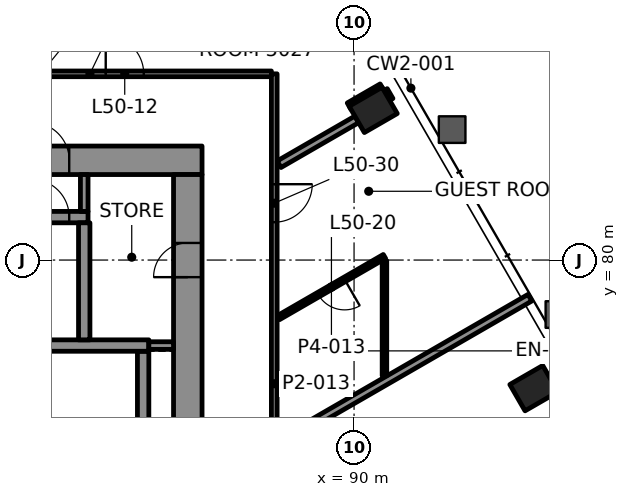
"""IFC4 building model, lengths in metres.
Left out: names, types, materials, properties, quantities, classifications, styles, units other than length and angle.
Written with IfcOpenShell. Run it as: python <this file> out.ifc"""

import sys

from ifc_helpers import new_model, si_unit, direction, frame, frame_2d, origin, origin_2d, place, context, subcontext, project, spatial, rectangle, hollow_rectangle, extrude, element, fill, save


model = new_model("IFC4")
c1 = context("Model", 3, precision=1e-05, world=origin(), true_north=direction((0.0, 1.0)))
c2 = subcontext(c1, "Body", "Model", "MODEL_VIEW")
j1 = project(units=[si_unit("LENGTHUNIT", "METRE"), si_unit("PLANEANGLEUNIT", "RADIAN")], contexts=[c1])
p1 = place(None, origin())
s1 = spatial("IfcSite", under=j1, at=p1, CompositionType="ELEMENT")
p2 = place(p1, origin())
s2 = spatial("IfcBuilding", under=s1, at=p2, CompositionType="ELEMENT")
p3 = place(p2, frame((0.0, 0.0, 214.3)))
s3 = spatial("IfcBuildingStorey", under=s2, at=p3, CompositionType="ELEMENT", Elevation=214.3)
for number, where, z_axis, x_axis in (
    (1, (94.732, 76.628, -0.0), (0.0, 0.0, 1.0), (-0.5, 0.866, 0.0)),
    (2, (90.504, 83.951, -0.0), (0.0, 0.0, 1.0), (-0.5, 0.866, 0.0)),
):
    element("IfcColumn", number, at=place(p3, frame(where, z_axis=z_axis, x_axis=x_axis)), inside=s3, PredefinedType="COLUMN", context=c2, shape_type="SweptSolid", body=[
        extrude(hollow_rectangle(XDim=0.8, YDim=1.0, WallThickness=0.05, at=origin_2d()), origin(), (0.0, 0.0, 1.0), 3.9),
    ])
p4 = place(p3, frame((64.0, 82.625, 0.0), z_axis=(0.0, 0.0, 1.0), x_axis=(1.0, 0.0, 0.0)))
e3 = element("IfcWall", 3, at=p4, inside=s3, PredefinedType="SHEAR", context=c2, shape_type="SweptSolid", body=[
    extrude(rectangle(XDim=22.0, YDim=0.75, at=frame_2d((11.0, 0.0))), origin(), (0.0, 0.0, 1.0), 3.7),
])
p5 = place(p4, frame((3.695, 0.0, 0.0)))
e4 = element("IfcOpeningElement", 4, at=p5, cuts=e3, PredefinedType="OPENING", context=c2, shape_type="SweptSolid", body=[
    extrude(rectangle(XDim=1.0, YDim=2.1, at=frame_2d((0.5, 1.05))), frame((0.0, 0.385, 0.0), z_axis=(0.0, -1.0, 0.0), x_axis=(1.0, 0.0, 0.0)), (0.0, 0.0, 1.0), 0.77),
])
p6 = place(p4, frame((17.505, 0.0, 0.0)))
e5 = element("IfcOpeningElement", 5, at=p6, cuts=e3, PredefinedType="OPENING", context=c2, shape_type="SweptSolid", body=[
    extrude(rectangle(XDim=1.0, YDim=2.1, at=frame_2d((0.5, 1.05))), frame((0.0, 0.385, 0.0), z_axis=(0.0, -1.0, 0.0), x_axis=(1.0, 0.0, 0.0)), (0.0, 0.0, 1.0), 0.77),
])
p7 = place(p4, frame((10.65, 0.0, 0.0)))
e6 = element("IfcOpeningElement", 6, at=p7, cuts=e3, PredefinedType="OPENING", context=c2, shape_type="SweptSolid", body=[
    extrude(rectangle(XDim=0.9, YDim=2.1, at=frame_2d((0.45, 1.05))), frame((0.0, 0.385, 0.0), z_axis=(0.0, -1.0, 0.0), x_axis=(1.0, 0.0, 0.0)), (0.0, 0.0, 1.0), 0.77),
])
p8 = place(p3, frame((85.625, 67.75, 0.0), z_axis=(0.0, 0.0, 1.0), x_axis=(0.0, 1.0, 0.0)))
e7 = element("IfcWall", 7, at=p8, inside=s3, PredefinedType="SHEAR", context=c2, shape_type="SweptSolid", body=[
    extrude(rectangle(XDim=14.5, YDim=0.75, at=frame_2d((7.25, 0.0))), origin(), (0.0, 0.0, 1.0), 3.7),
])
p9 = place(p8, frame((4.65, 0.0, 0.0)))
e8 = element("IfcOpeningElement", 8, at=p9, cuts=e7, PredefinedType="OPENING", context=c2, shape_type="SweptSolid", body=[
    extrude(rectangle(XDim=1.8, YDim=2.1, at=frame_2d((0.9, 1.05))), frame((0.0, 0.385, 0.0), z_axis=(0.0, -1.0, 0.0), x_axis=(1.0, 0.0, 0.0)), (0.0, 0.0, 1.0), 0.77),
])
p10 = place(p8, frame((11.8, 0.0, 0.0)))
e9 = element("IfcOpeningElement", 9, at=p10, cuts=e7, PredefinedType="OPENING", context=c2, shape_type="SweptSolid", body=[
    extrude(rectangle(XDim=0.9, YDim=2.1, at=frame_2d((0.45, 1.05))), frame((0.0, 0.385, 0.0), z_axis=(0.0, -1.0, 0.0), x_axis=(1.0, 0.0, 0.0)), (0.0, 0.0, 1.0), 0.77),
])
p11 = place(p3, frame((84.45, 75.0, 0.0), z_axis=(0.0, 0.0, 1.0), x_axis=(0.0, 1.0, 0.0)))
e10 = element("IfcWall", 10, at=p11, inside=s3, PredefinedType="SHEAR", context=c2, shape_type="SweptSolid", body=[
    extrude(rectangle(XDim=2.6, YDim=0.3, at=frame_2d((1.3, 0.0))), origin(), (0.0, 0.0, 1.0), 3.7),
])
p12 = place(p3, frame((67.15, 77.75, 0.0), z_axis=(0.0, 0.0, 1.0), x_axis=(1.0, 0.0, 0.0)))
e11 = element("IfcWall", 11, at=p12, inside=s3, PredefinedType="SHEAR", context=c2, shape_type="SweptSolid", body=[
    extrude(rectangle(XDim=17.45, YDim=0.3, at=frame_2d((8.725, 0.0))), origin(), (0.0, 0.0, 1.0), 3.7),
])
p13 = place(p12, frame((0.545, 0.0, 0.0)))
e12 = element("IfcOpeningElement", 12, at=p13, cuts=e11, PredefinedType="OPENING", context=c2, shape_type="SweptSolid", body=[
    extrude(rectangle(XDim=1.0, YDim=2.1, at=frame_2d((0.5, 1.05))), frame((0.0, 0.16, 0.0), z_axis=(0.0, -1.0, 0.0), x_axis=(1.0, 0.0, 0.0)), (0.0, 0.0, 1.0), 0.32),
])
p14 = place(p3, frame((76.14, 81.13, 0.0), z_axis=(0.0, 0.0, 1.0), x_axis=(1.0, 0.0, 0.0)))
e13 = element("IfcWall", 13, at=p14, inside=s3, PredefinedType="SHEAR", context=c2, shape_type="SweptSolid", body=[
    extrude(rectangle(XDim=6.86, YDim=0.3, at=frame_2d((3.43, 0.0))), origin(), (0.0, 0.0, 1.0), 3.7),
])
p15 = place(p14, frame((5.365, 0.0, 0.0)))
e14 = element("IfcOpeningElement", 14, at=p15, cuts=e13, PredefinedType="OPENING", context=c2, shape_type="SweptSolid", body=[
    extrude(rectangle(XDim=1.0, YDim=2.1, at=frame_2d((0.5, 1.05))), frame((0.0, 0.16, 0.0), z_axis=(0.0, -1.0, 0.0), x_axis=(1.0, 0.0, 0.0)), (0.0, 0.0, 1.0), 0.32),
])
p16 = place(p3, frame((82.9, 77.9, 0.0), z_axis=(0.0, 0.0, 1.0), x_axis=(0.0, 1.0, 0.0)))
e15 = element("IfcWall", 15, at=p16, inside=s3, PredefinedType="SHEAR", context=c2, shape_type="SweptSolid", body=[
    extrude(rectangle(XDim=3.08, YDim=0.3, at=frame_2d((1.54, 0.0))), origin(), (0.0, 0.0, 1.0), 3.7),
])
p17 = place(p3, frame((78.275, 84.9, 0.0), z_axis=(0.0, 0.0, 1.0), x_axis=(1.0, 0.0, 0.0)))
e16 = element("IfcWall", 16, at=p17, inside=s3, PredefinedType="PARTITIONING", context=c2, shape_type="SweptSolid", body=[
    extrude(rectangle(XDim=9.55, YDim=0.15, at=frame_2d((4.775, 0.0))), origin(), (0.0, 0.0, 1.0), 3.097),
])
p18 = place(p17, frame((5.191, 0.0, 0.0)))
e17 = element("IfcOpeningElement", 17, at=p18, cuts=e16, PredefinedType="OPENING", context=c2, shape_type="SweptSolid", body=[
    extrude(rectangle(XDim=1.0, YDim=2.1, at=frame_2d((0.5, 1.05))), frame((0.0, 0.085, 0.0), z_axis=(0.0, -1.0, 0.0), x_axis=(1.0, 0.0, 0.0)), (0.0, 0.0, 1.0), 0.17),
])
p19 = place(p3, frame((88.027, 75.198, 0.0), z_axis=(0.0, 0.0, 1.0), x_axis=(0.866028758719, 0.499994189038, 0.0)))
e18 = element("IfcWall", 18, at=p19, inside=s3, PredefinedType="PARTITIONING", context=c2, shape_type="SweptSolid", body=[
    extrude(rectangle(XDim=7.622, YDim=0.2, at=frame_2d((3.811, 0.0))), origin(), (0.0, 0.0, 1.0), 3.022),
])
p20 = place(p3, frame((90.8, 80.095, 0.0), z_axis=(0.0, 0.0, 1.0), x_axis=(-0.866029130051, -0.499993545862, 0.0)))
e19 = element("IfcWall", 19, at=p20, inside=s3, PredefinedType="PARTITIONING", context=c2, shape_type="SweptSolid", body=[
    extrude(rectangle(XDim=3.222, YDim=0.12, at=frame_2d((1.611, 0.0))), origin(), (0.0, 0.0, 1.0), 3.1),
])
p21 = place(p20, frame((1.211, 0.0, 0.0)))
e20 = element("IfcOpeningElement", 20, at=p21, cuts=e19, PredefinedType="OPENING", context=c2, shape_type="SweptSolid", body=[
    extrude(rectangle(XDim=0.8, YDim=2.1, at=frame_2d((0.4, 1.05))), frame((0.0, 0.07, 0.0), z_axis=(0.0, -1.0, 0.0), x_axis=(1.0, 0.0, 0.0)), (0.0, 0.0, 1.0), 0.14),
])
p22 = place(p3, frame((88.027, 82.521, 0.0), z_axis=(0.0, 0.0, 1.0), x_axis=(0.866032292145, 0.49998806882, 0.0)))
e21 = element("IfcWall", 21, at=p22, inside=s3, PredefinedType="PARTITIONING", context=c2, shape_type="SweptSolid", body=[
    extrude(rectangle(XDim=2.36, YDim=0.2, at=frame_2d((1.18, 0.0))), origin(), (0.0, 0.0, 1.0), 3.1),
])
p23 = place(p3, frame((89.871, 84.048, 0.0), z_axis=(0.0, 0.0, 1.0), x_axis=(0.866010750942, 0.50002537861, 0.0)))
e22 = element("IfcWall", 22, at=p23, inside=s3, PredefinedType="PARTITIONING", context=c2, shape_type="SweptSolid", body=[
    extrude(rectangle(XDim=1.0, YDim=0.2, at=frame_2d((0.5, 0.0))), origin(), (0.0, 0.0, 1.0), 3.022),
])
p24 = place(p3, frame((80.534, 85.03, 0.0), z_axis=(0.0, 0.0, 1.0), x_axis=(0.866014884179, 0.500018220049, 0.0)))
e23 = element("IfcWall", 23, at=p24, inside=s3, PredefinedType="PARTITIONING", context=c2, shape_type="SweptSolid", body=[
    extrude(rectangle(XDim=5.74, YDim=0.12, at=frame_2d((2.87, 0.0))), origin(), (0.0, 0.0, 1.0), 3.1),
])
p25 = place(p3, frame((90.8, 76.955, 0.0), z_axis=(0.0, 0.0, 1.0), x_axis=(0.0, 1.0, 0.0)))
e24 = element("IfcWall", 24, at=p25, inside=s3, PredefinedType="PARTITIONING", context=c2, shape_type="SweptSolid", body=[
    extrude(rectangle(XDim=3.031, YDim=0.12, at=frame_2d((1.515, 0.0))), origin(), (0.0, 0.0, 1.0), 3.1),
])
p26 = place(p3, frame((87.9, 84.9, 0.0), z_axis=(0.0, 0.0, 1.0), x_axis=(0.0, -1.0, 0.0)))
e25 = element("IfcWall", 25, at=p26, inside=s3, PredefinedType="PARTITIONING", context=c2, shape_type="SweptSolid", body=[
    extrude(rectangle(XDim=16.309, YDim=0.15, at=frame_2d((8.154, 0.0))), origin(), (0.0, 0.0, 1.0), 3.1),
])
p27 = place(p26, frame((2.904, 0.0, 0.0)))
e26 = element("IfcOpeningElement", 26, at=p27, cuts=e25, PredefinedType="OPENING", context=c2, shape_type="SweptSolid", body=[
    extrude(rectangle(XDim=1.0, YDim=2.1, at=frame_2d((0.5, 1.05))), frame((0.0, 0.085, 0.0), z_axis=(0.0, -1.0, 0.0), x_axis=(1.0, 0.0, 0.0)), (0.0, 0.0, 1.0), 0.17),
])
p28 = place(p26, frame((10.227, 0.0, 0.0)))
e27 = element("IfcOpeningElement", 27, at=p28, cuts=e25, PredefinedType="OPENING", context=c2, shape_type="SweptSolid", body=[
    extrude(rectangle(XDim=1.0, YDim=2.1, at=frame_2d((0.5, 1.05))), frame((0.0, 0.085, 0.0), z_axis=(0.0, -1.0, 0.0), x_axis=(1.0, 0.0, 0.0)), (0.0, 0.0, 1.0), 0.17),
])
p29 = place(p3, frame((90.937, 84.201, 0.0), z_axis=(0.0, 0.0, 1.0), x_axis=(-0.500074377092, 0.865982457891, 0.0)))
e28 = element("IfcWall", 28, at=p29, inside=s3, PredefinedType="PARTITIONING", context=c2, shape_type="SweptSolid", body=[
    extrude(rectangle(XDim=0.3, YDim=0.2, at=frame_2d((0.15, 0.0))), origin(), (0.0, 0.0, 1.0), 3.1),
])
p30 = place(p3, frame((84.6, 77.75, 0.0), z_axis=(0.0, 0.0, 1.0), x_axis=(1.0, 0.0, 0.0)))
e29 = element("IfcWall", 29, at=p30, inside=s3, PredefinedType="PARTITIONING", context=c2, shape_type="SweptSolid", body=[
    extrude(rectangle(XDim=0.65, YDim=0.2, at=frame_2d((0.325, 0.0))), origin(), (0.0, 0.0, 1.0), 3.7),
])
p31 = place(p3, frame((82.9, 81.28, 0.0), z_axis=(0.0, 0.0, 1.0), x_axis=(0.0, 1.0, 0.0)))
e30 = element("IfcWall", 30, at=p31, inside=s3, PredefinedType="PARTITIONING", context=c2, shape_type="SweptSolid", body=[
    extrude(rectangle(XDim=0.97, YDim=0.2, at=frame_2d((0.485, 0.0))), origin(), (0.0, 0.0, 1.0), 3.7),
])
p32 = place(p18, origin())
e31 = element("IfcDoor", 31, at=p32, inside=s3, OperationType="SINGLE_SWING_RIGHT", PredefinedType="DOOR", context=c2, shape_type="SweptSolid", body=[
    extrude(rectangle(XDim=1.0, YDim=2.1, at=frame_2d((0.5, 1.05))), frame((0.0, 0.025, 0.0), z_axis=(0.0, -1.0, 0.0), x_axis=(1.0, 0.0, 0.0)), (0.0, 0.0, 1.0), 0.05),
])
fill(e17, e31)
p33 = place(p21, origin())
e32 = element("IfcDoor", 32, at=p33, inside=s3, OperationType="SINGLE_SWING_RIGHT", PredefinedType="DOOR", context=c2, shape_type="SweptSolid", body=[
    extrude(rectangle(XDim=0.8, YDim=2.1, at=frame_2d((0.4, 1.05))), frame((0.0, 0.025, 0.0), z_axis=(0.0, -1.0, 0.0), x_axis=(1.0, 0.0, 0.0)), (0.0, 0.0, 1.0), 0.05),
])
fill(e20, e32)
p34 = place(p27, origin())
e33 = element("IfcDoor", 33, at=p34, inside=s3, OperationType="SINGLE_SWING_LEFT", PredefinedType="DOOR", context=c2, shape_type="SweptSolid", body=[
    extrude(rectangle(XDim=1.0, YDim=2.1, at=frame_2d((0.5, 1.05))), frame((0.0, 0.025, 0.0), z_axis=(0.0, -1.0, 0.0), x_axis=(1.0, 0.0, 0.0)), (0.0, 0.0, 1.0), 0.05),
])
fill(e26, e33)
p35 = place(p15, origin())
e34 = element("IfcDoor", 34, at=p35, inside=s3, OperationType="SINGLE_SWING_RIGHT", PredefinedType="DOOR", context=c2, shape_type="SweptSolid", body=[
    extrude(rectangle(XDim=1.0, YDim=2.1, at=frame_2d((0.5, 1.05))), frame((0.0, 0.025, 0.0), z_axis=(0.0, -1.0, 0.0), x_axis=(1.0, 0.0, 0.0)), (0.0, 0.0, 1.0), 0.05),
])
fill(e14, e34)
p36 = place(p6, origin())
e35 = element("IfcDoor", 35, at=p36, inside=s3, OperationType="SINGLE_SWING_LEFT", PredefinedType="DOOR", context=c2, shape_type="SweptSolid", body=[
    extrude(rectangle(XDim=1.0, YDim=2.1, at=frame_2d((0.5, 1.05))), frame((0.0, 0.095, 0.0), z_axis=(0.0, -1.0, 0.0), x_axis=(1.0, 0.0, 0.0)), (0.0, 0.0, 1.0), 0.19),
])
fill(e5, e35)
p37 = place(p10, origin())
e36 = element("IfcDoor", 36, at=p37, inside=s3, OperationType="SINGLE_SWING_RIGHT", PredefinedType="DOOR", context=c2, shape_type="SweptSolid", body=[
    extrude(rectangle(XDim=0.9, YDim=2.1, at=frame_2d((0.45, 1.05))), frame((0.0, 0.095, 0.0), z_axis=(0.0, -1.0, 0.0), x_axis=(1.0, 0.0, 0.0)), (0.0, 0.0, 1.0), 0.19),
])
fill(e9, e36)
save(model, sys.argv[1])
